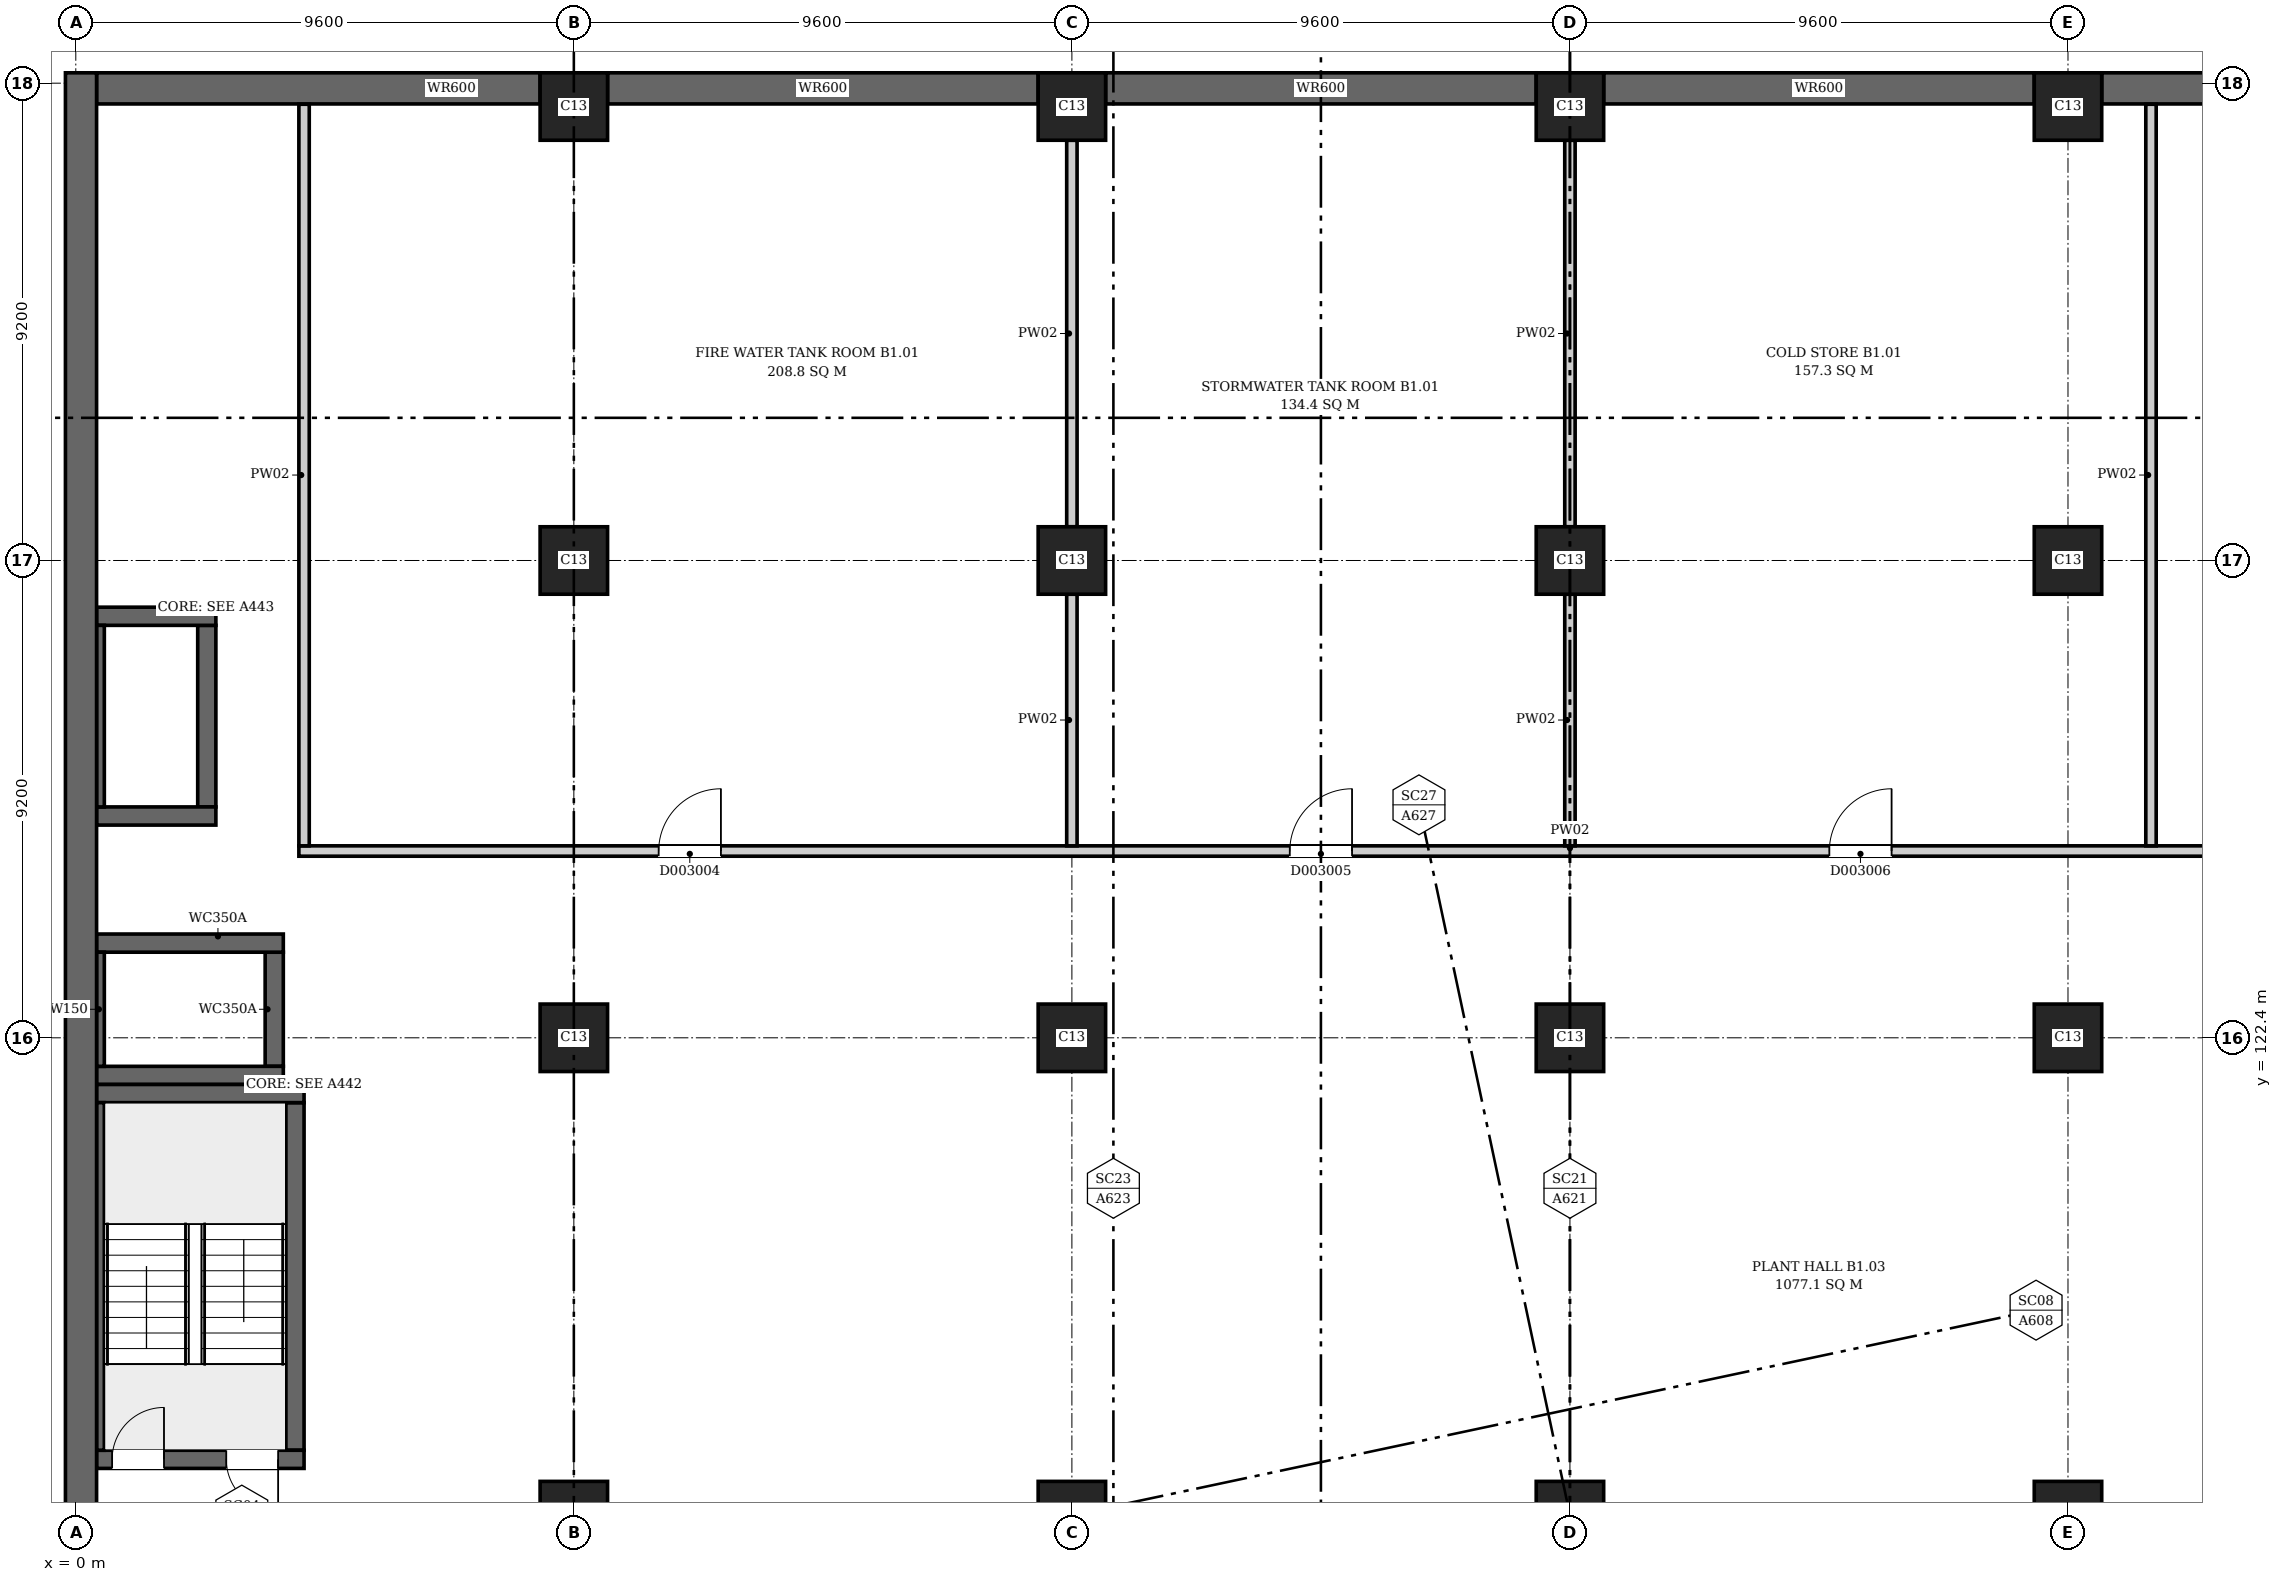
"""IFC4 building model, lengths in metres.
Left out: names, types, materials, properties, quantities, classifications, styles, units other than length and angle.
Written with IfcOpenShell. Run it as: python <this file> out.ifc"""

import sys

from ifc_helpers import new_model, si_unit, direction, frame, frame_2d, origin, origin_2d, place, context, subcontext, project, spatial, rectangle, extrude, element, fill, save


model = new_model("IFC4")
c1 = context("Model", 3, precision=1e-05, world=origin(), true_north=direction((0.0, 1.0)))
c2 = subcontext(c1, "Body", "Model", "MODEL_VIEW")
j1 = project(units=[si_unit("LENGTHUNIT", "METRE"), si_unit("PLANEANGLEUNIT", "RADIAN")], contexts=[c1])
p1 = place(None, origin())
s1 = spatial("IfcSite", under=j1, at=p1, CompositionType="ELEMENT")
p2 = place(p1, origin())
s2 = spatial("IfcBuilding", under=s1, at=p2, CompositionType="ELEMENT")
p3 = place(p2, frame((0.0, 0.0, -5.5)))
s3 = spatial("IfcBuildingStorey", under=s2, at=p3, CompositionType="ELEMENT", Elevation=-5.5)
p4 = place(p3, frame((0.101, 94.12, 0.0), z_axis=(0.0, 0.0, 1.0), x_axis=(0.0, 1.0, 0.0)))
e1 = element("IfcWall", 1, at=p4, inside=s3, PredefinedType="SOLIDWALL", context=c2, shape_type="SweptSolid", body=[
    extrude(rectangle(XDim=46.88, YDim=0.6, at=frame_2d((23.44, 0.0))), origin(), (0.0, 0.0, 1.0), 5.5),
])
p5 = place(p3, frame((0.4, 140.7, 0.0), z_axis=(0.0, 0.0, 1.0), x_axis=(1.0, 0.0, 0.0)))
e2 = element("IfcWall", 2, at=p5, inside=s3, PredefinedType="SOLIDWALL", context=c2, shape_type="SweptSolid", body=[
    extrude(rectangle(XDim=8.55, YDim=0.6, at=frame_2d((4.275, 0.0))), origin(), (0.0, 0.0, 1.0), 5.5),
])
p6 = place(p3, frame((10.25, 140.7, 0.0), z_axis=(0.0, 0.0, 1.0), x_axis=(1.0, 0.0, 0.0)))
e3 = element("IfcWall", 3, at=p6, inside=s3, PredefinedType="SOLIDWALL", context=c2, shape_type="SweptSolid", body=[
    extrude(rectangle(XDim=8.3, YDim=0.6, at=frame_2d((4.15, 0.0))), origin(), (0.0, 0.0, 1.0), 5.5),
])
p7 = place(p3, frame((19.85, 140.7, 0.0), z_axis=(0.0, 0.0, 1.0), x_axis=(1.0, 0.0, 0.0)))
e4 = element("IfcWall", 4, at=p7, inside=s3, PredefinedType="SOLIDWALL", context=c2, shape_type="SweptSolid", body=[
    extrude(rectangle(XDim=8.3, YDim=0.6, at=frame_2d((4.15, 0.0))), origin(), (0.0, 0.0, 1.0), 5.5),
])
for number, where, z_axis, x_axis in (
    (5, (29.45, 140.7, 0.0), (0.0, 0.0, 1.0), (1.0, 0.0, 0.0)),
    (6, (39.05, 140.7, 0.0), (0.0, 0.0, 1.0), (1.0, 0.0, 0.0)),
):
    element("IfcWall", number, at=place(p3, frame(where, z_axis=z_axis, x_axis=x_axis)), inside=s3, PredefinedType="SOLIDWALL", context=c2, shape_type="SweptSolid", body=[
        extrude(rectangle(XDim=8.3, YDim=0.6, at=frame_2d((4.15, 0.0))), origin(), (0.0, 0.0, 1.0), 5.5),
    ])
p8 = place(p3, frame((0.4, 114.275, 0.0), z_axis=(0.0, 0.0, 1.0), x_axis=(1.0, 0.0, 0.0)))
e7 = element("IfcWall", 7, at=p8, inside=s3, PredefinedType="SHEAR", context=c2, shape_type="SweptSolid", body=[
    extrude(rectangle(XDim=4.0, YDim=0.35, at=frame_2d((2.0, 0.0))), origin(), (0.0, 0.0, 1.0), 5.5),
])
p9 = place(p8, frame((0.3, 0.0, 0.0)))
e8 = element("IfcOpeningElement", 8, at=p9, cuts=e7, PredefinedType="OPENING", context=c2, shape_type="SweptSolid", body=[
    extrude(rectangle(XDim=1.0, YDim=2.1, at=frame_2d((0.5, 1.05))), frame((0.0, 0.185, 0.0), z_axis=(0.0, -1.0, 0.0), x_axis=(1.0, 0.0, 0.0)), (0.0, 0.0, 1.0), 0.37),
])
p10 = place(p8, frame((2.5, 0.0, 0.0)))
e9 = element("IfcOpeningElement", 9, at=p10, cuts=e7, PredefinedType="OPENING", context=c2, shape_type="SweptSolid", body=[
    extrude(rectangle(XDim=1.0, YDim=2.1, at=frame_2d((0.5, 1.05))), frame((0.0, 0.185, 0.0), z_axis=(0.0, -1.0, 0.0), x_axis=(1.0, 0.0, 0.0)), (0.0, 0.0, 1.0), 0.37),
])
p11 = place(p3, frame((0.4, 121.325, 0.0), z_axis=(0.0, 0.0, 1.0), x_axis=(1.0, 0.0, 0.0)))
e10 = element("IfcWall", 10, at=p11, inside=s3, PredefinedType="SHEAR", context=c2, shape_type="SweptSolid", body=[
    extrude(rectangle(XDim=4.0, YDim=0.35, at=frame_2d((2.0, 0.0))), origin(), (0.0, 0.0, 1.0), 5.5),
])
p12 = place(p3, frame((0.475, 114.45, 0.0), z_axis=(0.0, 0.0, 1.0), x_axis=(0.0, 1.0, 0.0)))
e11 = element("IfcWall", 11, at=p12, inside=s3, PredefinedType="SHEAR", context=c2, shape_type="SweptSolid", body=[
    extrude(rectangle(XDim=6.7, YDim=0.15, at=frame_2d((3.35, 0.0))), origin(), (0.0, 0.0, 1.0), 5.5),
])
p13 = place(p3, frame((4.225, 114.45, 0.0), z_axis=(0.0, 0.0, 1.0), x_axis=(0.0, 1.0, 0.0)))
e12 = element("IfcWall", 12, at=p13, inside=s3, PredefinedType="SHEAR", context=c2, shape_type="SweptSolid", body=[
    extrude(rectangle(XDim=6.7, YDim=0.35, at=frame_2d((3.35, 0.0))), origin(), (0.0, 0.0, 1.0), 5.5),
])
for number, where, z_axis, x_axis in (
    (13, (0.4, 121.675, 0.0), (0.0, 0.0, 1.0), (1.0, 0.0, 0.0)),
    (14, (0.4, 124.225, 0.0), (0.0, 0.0, 1.0), (1.0, 0.0, 0.0)),
):
    element("IfcWall", number, at=place(p3, frame(where, z_axis=z_axis, x_axis=x_axis)), inside=s3, PredefinedType="SHEAR", context=c2, shape_type="SweptSolid", body=[
        extrude(rectangle(XDim=3.6, YDim=0.35, at=frame_2d((1.8, 0.0))), origin(), (0.0, 0.0, 1.0), 5.5),
    ])
p14 = place(p3, frame((0.475, 121.85, 0.0), z_axis=(0.0, 0.0, 1.0), x_axis=(0.0, 1.0, 0.0)))
e15 = element("IfcWall", 15, at=p14, inside=s3, PredefinedType="SHEAR", context=c2, shape_type="SweptSolid", body=[
    extrude(rectangle(XDim=2.2, YDim=0.15, at=frame_2d((1.1, 0.0))), origin(), (0.0, 0.0, 1.0), 5.5),
])
p15 = place(p3, frame((3.825, 121.85, 0.0), z_axis=(0.0, 0.0, 1.0), x_axis=(0.0, 1.0, 0.0)))
e16 = element("IfcWall", 16, at=p15, inside=s3, PredefinedType="SHEAR", context=c2, shape_type="SweptSolid", body=[
    extrude(rectangle(XDim=2.2, YDim=0.35, at=frame_2d((1.1, 0.0))), origin(), (0.0, 0.0, 1.0), 5.5),
])
for number, where, z_axis, x_axis in (
    (17, (0.4, 126.675, 0.0), (0.0, 0.0, 1.0), (1.0, 0.0, 0.0)),
    (18, (0.4, 130.525, 0.0), (0.0, 0.0, 1.0), (1.0, 0.0, 0.0)),
):
    element("IfcWall", number, at=place(p3, frame(where, z_axis=z_axis, x_axis=x_axis)), inside=s3, PredefinedType="SHEAR", context=c2, shape_type="SweptSolid", body=[
        extrude(rectangle(XDim=2.3, YDim=0.35, at=frame_2d((1.15, 0.0))), origin(), (0.0, 0.0, 1.0), 5.5),
    ])
p16 = place(p3, frame((0.475, 126.85, 0.0), z_axis=(0.0, 0.0, 1.0), x_axis=(0.0, 1.0, 0.0)))
e19 = element("IfcWall", 19, at=p16, inside=s3, PredefinedType="SHEAR", context=c2, shape_type="SweptSolid", body=[
    extrude(rectangle(XDim=3.5, YDim=0.15, at=frame_2d((1.75, 0.0))), origin(), (0.0, 0.0, 1.0), 5.5),
])
p17 = place(p3, frame((2.525, 126.85, 0.0), z_axis=(0.0, 0.0, 1.0), x_axis=(0.0, 1.0, 0.0)))
e20 = element("IfcWall", 20, at=p17, inside=s3, PredefinedType="SHEAR", context=c2, shape_type="SweptSolid", body=[
    extrude(rectangle(XDim=3.5, YDim=0.35, at=frame_2d((1.75, 0.0))), origin(), (0.0, 0.0, 1.0), 5.5),
])
for number, where, z_axis, x_axis in (
    (21, (9.6, 113.2, 0.0), (0.0, 0.0, 1.0), (1.0, 0.0, 0.0)),
    (22, (19.2, 113.2, 0.0), (0.0, 0.0, 1.0), (1.0, 0.0, 0.0)),
    (23, (28.8, 113.2, 0.0), (0.0, 0.0, 1.0), (1.0, 0.0, 0.0)),
    (24, (38.4, 113.2, 0.0), (0.0, 0.0, 1.0), (1.0, 0.0, 0.0)),
    (25, (9.6, 122.4, 0.0), (0.0, 0.0, 1.0), (1.0, 0.0, 0.0)),
    (26, (19.2, 122.4, 0.0), (0.0, 0.0, 1.0), (1.0, 0.0, 0.0)),
    (27, (28.8, 122.4, 0.0), (0.0, 0.0, 1.0), (1.0, 0.0, 0.0)),
    (28, (38.4, 122.4, 0.0), (0.0, 0.0, 1.0), (1.0, 0.0, 0.0)),
    (29, (9.6, 131.6, 0.0), (0.0, 0.0, 1.0), (1.0, 0.0, 0.0)),
    (30, (19.2, 131.6, 0.0), (0.0, 0.0, 1.0), (1.0, 0.0, 0.0)),
    (31, (28.8, 131.6, 0.0), (0.0, 0.0, 1.0), (1.0, 0.0, 0.0)),
    (32, (38.4, 131.6, 0.0), (0.0, 0.0, 1.0), (1.0, 0.0, 0.0)),
    (33, (9.6, 140.35, 0.0), (0.0, 0.0, 1.0), (1.0, 0.0, 0.0)),
    (34, (19.2, 140.35, 0.0), (0.0, 0.0, 1.0), (1.0, 0.0, 0.0)),
    (35, (28.8, 140.35, 0.0), (0.0, 0.0, 1.0), (1.0, 0.0, 0.0)),
    (36, (38.4, 140.35, 0.0), (0.0, 0.0, 1.0), (1.0, 0.0, 0.0)),
):
    element("IfcColumn", number, at=place(p3, frame(where, z_axis=z_axis, x_axis=x_axis)), inside=s3, PredefinedType="COLUMN", context=c2, shape_type="SweptSolid", body=[
        extrude(rectangle(XDim=1.3, YDim=1.3, at=origin_2d()), origin(), (0.0, 0.0, 1.0), 5.5),
    ])
p18 = place(p3, frame((4.3, 126.0, 0.0), z_axis=(0.0, 0.0, 1.0), x_axis=(1.0, 0.0, 0.0)))
e37 = element("IfcWall", 37, at=p18, inside=s3, PredefinedType="PARTITIONING", context=c2, shape_type="SweptSolid", body=[
    extrude(rectangle(XDim=49.0, YDim=0.2, at=frame_2d((24.5, 0.0))), origin(), (0.0, 0.0, 1.0), 5.15),
])
p19 = place(p18, frame((6.935, 0.0, 0.0)))
e38 = element("IfcOpeningElement", 38, at=p19, cuts=e37, PredefinedType="OPENING", context=c2, shape_type="SweptSolid", body=[
    extrude(rectangle(XDim=1.2, YDim=2.1, at=frame_2d((0.6, 1.05))), frame((0.0, 0.11, 0.0), z_axis=(0.0, -1.0, 0.0), x_axis=(1.0, 0.0, 0.0)), (0.0, 0.0, 1.0), 0.22),
])
p20 = place(p18, frame((19.1, 0.0, 0.0)))
e39 = element("IfcOpeningElement", 39, at=p20, cuts=e37, PredefinedType="OPENING", context=c2, shape_type="SweptSolid", body=[
    extrude(rectangle(XDim=1.2, YDim=2.1, at=frame_2d((0.6, 1.05))), frame((0.0, 0.11, 0.0), z_axis=(0.0, -1.0, 0.0), x_axis=(1.0, 0.0, 0.0)), (0.0, 0.0, 1.0), 0.22),
])
p21 = place(p18, frame((29.5, 0.0, 0.0)))
e40 = element("IfcOpeningElement", 40, at=p21, cuts=e37, PredefinedType="OPENING", context=c2, shape_type="SweptSolid", body=[
    extrude(rectangle(XDim=1.2, YDim=2.1, at=frame_2d((0.6, 1.05))), frame((0.0, 0.11, 0.0), z_axis=(0.0, -1.0, 0.0), x_axis=(1.0, 0.0, 0.0)), (0.0, 0.0, 1.0), 0.22),
])
p22 = place(p18, frame((41.665, 0.0, 0.0)))
e41 = element("IfcOpeningElement", 41, at=p22, cuts=e37, PredefinedType="OPENING", context=c2, shape_type="SweptSolid", body=[
    extrude(rectangle(XDim=1.2, YDim=2.1, at=frame_2d((0.6, 1.05))), frame((0.0, 0.11, 0.0), z_axis=(0.0, -1.0, 0.0), x_axis=(1.0, 0.0, 0.0)), (0.0, 0.0, 1.0), 0.22),
])
p23 = place(p3, frame((4.4, 126.1, 0.0), z_axis=(0.0, 0.0, 1.0), x_axis=(0.0, 1.0, 0.0)))
e42 = element("IfcWall", 42, at=p23, inside=s3, PredefinedType="PARTITIONING", context=c2, shape_type="SweptSolid", body=[
    extrude(rectangle(XDim=14.294, YDim=0.2, at=frame_2d((7.147, 0.0))), origin(), (0.0, 0.0, 1.0), 5.15),
])
p24 = place(p3, frame((19.2, 126.1, 0.0), z_axis=(0.0, 0.0, 1.0), x_axis=(0.0, 1.0, 0.0)))
e43 = element("IfcWall", 43, at=p24, inside=s3, PredefinedType="PARTITIONING", context=c2, shape_type="SweptSolid", body=[
    extrude(rectangle(XDim=4.85, YDim=0.2, at=frame_2d((2.425, 0.0))), origin(), (0.0, 0.0, 1.0), 5.15),
])
p25 = place(p3, frame((19.2, 132.25, 0.0), z_axis=(0.0, 0.0, 1.0), x_axis=(0.0, 1.0, 0.0)))
e44 = element("IfcWall", 44, at=p25, inside=s3, PredefinedType="PARTITIONING", context=c2, shape_type="SweptSolid", body=[
    extrude(rectangle(XDim=7.45, YDim=0.2, at=frame_2d((3.725, 0.0))), origin(), (0.0, 0.0, 1.0), 5.15),
])
p26 = place(p3, frame((28.8, 126.1, 0.0), z_axis=(0.0, 0.0, 1.0), x_axis=(0.0, 1.0, 0.0)))
e45 = element("IfcWall", 45, at=p26, inside=s3, PredefinedType="PARTITIONING", context=c2, shape_type="SweptSolid", body=[
    extrude(rectangle(XDim=4.85, YDim=0.2, at=frame_2d((2.425, 0.0))), origin(), (0.0, 0.0, 1.0), 5.15),
])
p27 = place(p3, frame((28.8, 132.25, 0.0), z_axis=(0.0, 0.0, 1.0), x_axis=(0.0, 1.0, 0.0)))
e46 = element("IfcWall", 46, at=p27, inside=s3, PredefinedType="PARTITIONING", context=c2, shape_type="SweptSolid", body=[
    extrude(rectangle(XDim=7.45, YDim=0.2, at=frame_2d((3.725, 0.0))), origin(), (0.0, 0.0, 1.0), 5.15),
])
p28 = place(p3, frame((40.0, 126.1, 0.0), z_axis=(0.0, 0.0, 1.0), x_axis=(0.0, 1.0, 0.0)))
e47 = element("IfcWall", 47, at=p28, inside=s3, PredefinedType="PARTITIONING", context=c2, shape_type="SweptSolid", body=[
    extrude(rectangle(XDim=14.294, YDim=0.2, at=frame_2d((7.147, 0.0))), origin(), (0.0, 0.0, 1.0), 5.15),
])
p29 = place(p9, origin())
e48 = element("IfcDoor", 48, at=p29, inside=s3, OperationType="SINGLE_SWING_RIGHT", PredefinedType="DOOR", context=c2, shape_type="SweptSolid", body=[
    extrude(rectangle(XDim=1.0, YDim=2.1, at=frame_2d((0.5, 1.05))), frame((0.0, 0.025, 0.0), z_axis=(0.0, -1.0, 0.0), x_axis=(1.0, 0.0, 0.0)), (0.0, 0.0, 1.0), 0.05),
])
fill(e8, e48)
p30 = place(p10, origin())
e49 = element("IfcDoor", 49, at=p30, inside=s3, OperationType="SINGLE_SWING_LEFT", PredefinedType="DOOR", context=c2, shape_type="SweptSolid", body=[
    extrude(rectangle(XDim=1.0, YDim=2.1, at=frame_2d((0.5, 1.05))), frame((0.0, 0.025, 0.0), z_axis=(0.0, -1.0, 0.0), x_axis=(1.0, 0.0, 0.0)), (0.0, 0.0, 1.0), 0.05),
])
fill(e9, e49)
p31 = place(p19, origin())
e50 = element("IfcDoor", 50, at=p31, inside=s3, OperationType="SINGLE_SWING_RIGHT", PredefinedType="DOOR", context=c2, shape_type="SweptSolid", body=[
    extrude(rectangle(XDim=1.2, YDim=2.1, at=frame_2d((0.6, 1.05))), frame((0.0, 0.025, 0.0), z_axis=(0.0, -1.0, 0.0), x_axis=(1.0, 0.0, 0.0)), (0.0, 0.0, 1.0), 0.05),
])
fill(e38, e50)
p32 = place(p20, origin())
e51 = element("IfcDoor", 51, at=p32, inside=s3, OperationType="SINGLE_SWING_RIGHT", PredefinedType="DOOR", context=c2, shape_type="SweptSolid", body=[
    extrude(rectangle(XDim=1.2, YDim=2.1, at=frame_2d((0.6, 1.05))), frame((0.0, 0.025, 0.0), z_axis=(0.0, -1.0, 0.0), x_axis=(1.0, 0.0, 0.0)), (0.0, 0.0, 1.0), 0.05),
])
fill(e39, e51)
p33 = place(p21, origin())
e52 = element("IfcDoor", 52, at=p33, inside=s3, OperationType="SINGLE_SWING_RIGHT", PredefinedType="DOOR", context=c2, shape_type="SweptSolid", body=[
    extrude(rectangle(XDim=1.2, YDim=2.1, at=frame_2d((0.6, 1.05))), frame((0.0, 0.025, 0.0), z_axis=(0.0, -1.0, 0.0), x_axis=(1.0, 0.0, 0.0)), (0.0, 0.0, 1.0), 0.05),
])
fill(e40, e52)
save(model, sys.argv[1])
